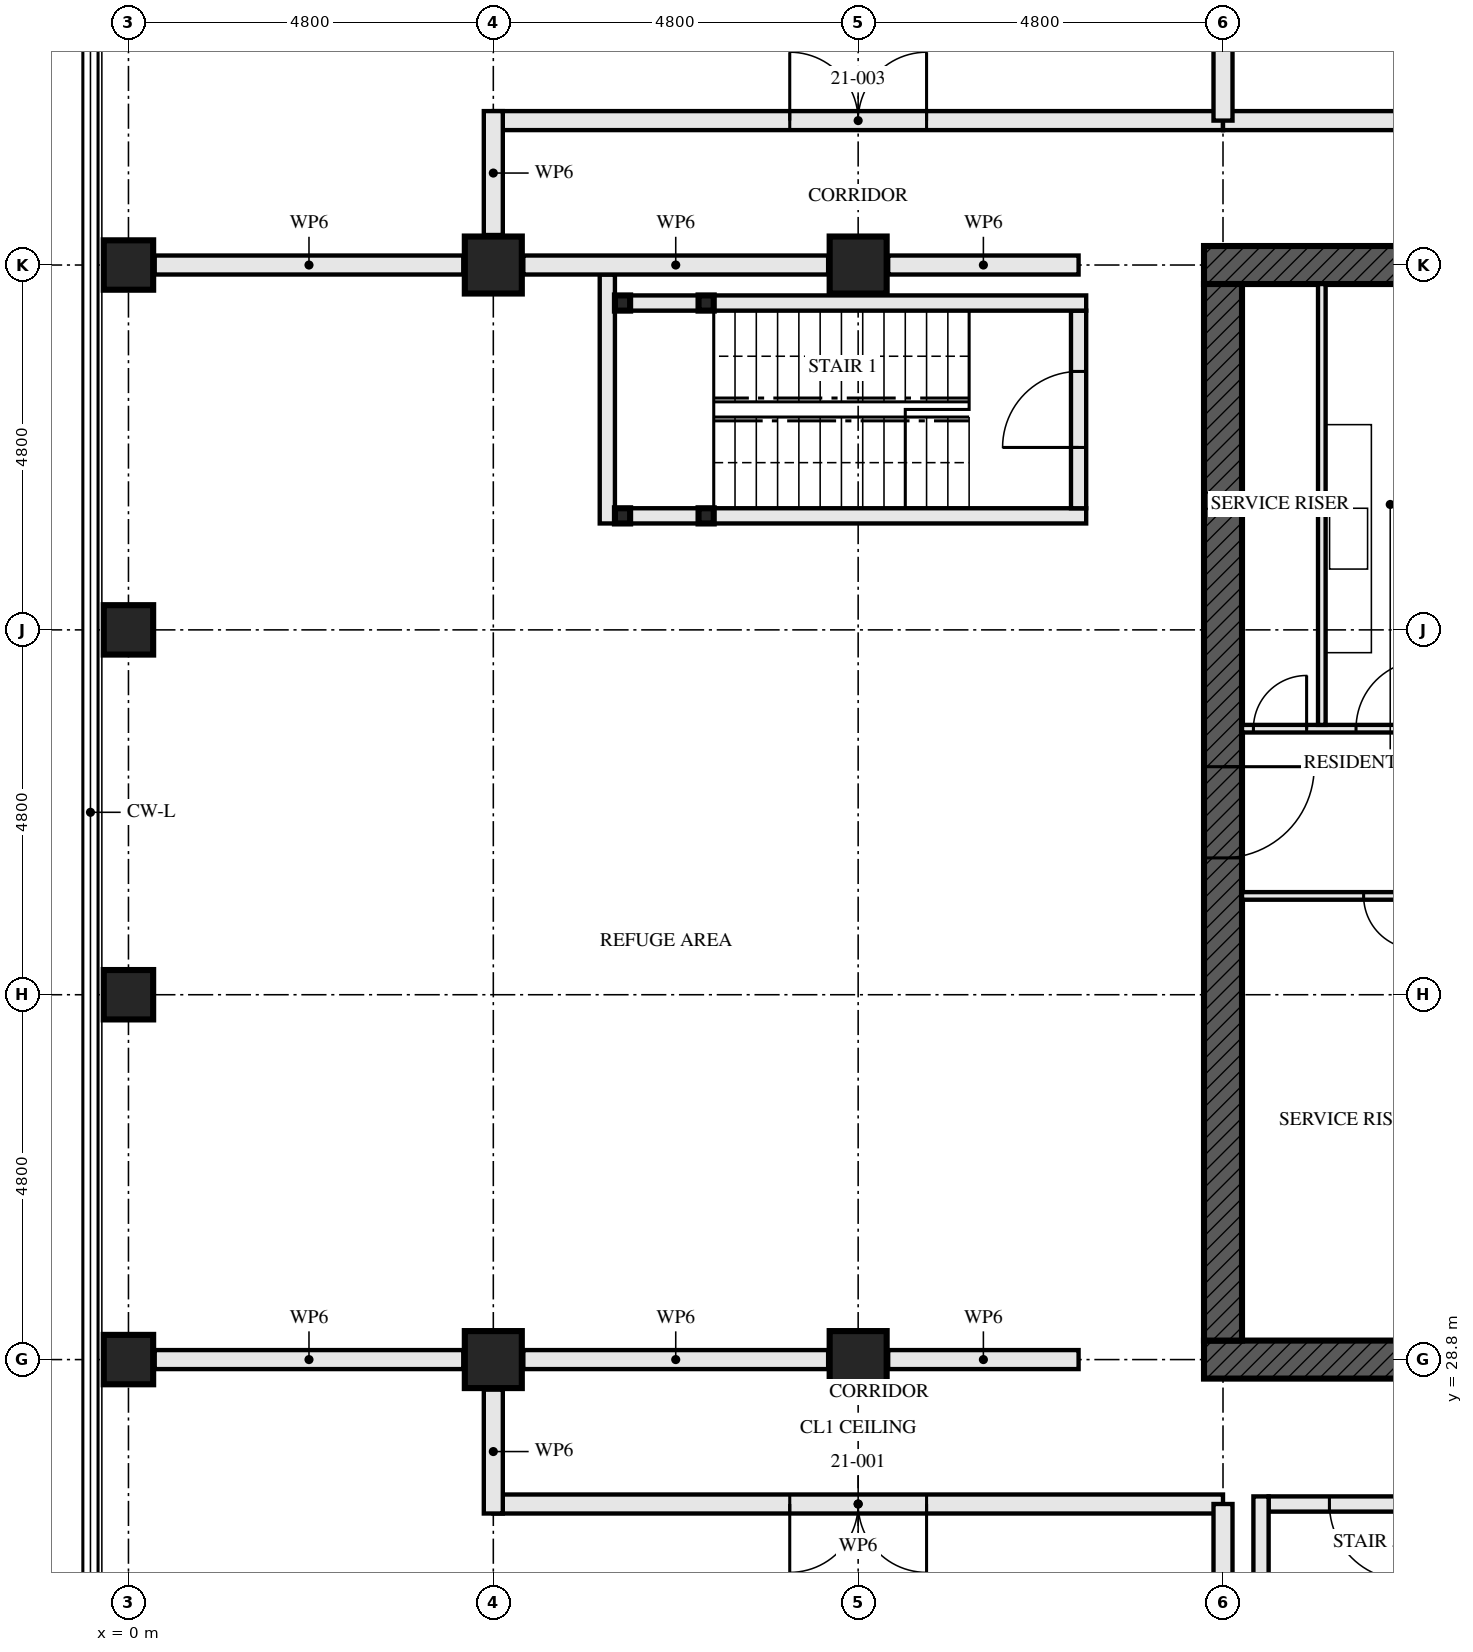
"""IFC4 building model, lengths in metres.
Left out: names, types, materials, properties, quantities, classifications, styles, units other than length and angle.
Written with IfcOpenShell. Run it as: python <this file> out.ifc"""

import sys

from ifc_helpers import new_model, si_unit, direction, frame, frame_2d, origin, origin_2d, place, context, subcontext, project, spatial, rectangle, hollow_rectangle, extrude, element, fill, save


model = new_model("IFC4")
c1 = context("Model", 3, precision=1e-05, world=origin(), true_north=direction((0.0, 1.0)))
c2 = subcontext(c1, "Body", "Model", "MODEL_VIEW")
j1 = project(units=[si_unit("LENGTHUNIT", "METRE"), si_unit("PLANEANGLEUNIT", "RADIAN")], contexts=[c1])
p1 = place(None, origin())
s1 = spatial("IfcSite", under=j1, at=p1, CompositionType="ELEMENT")
p2 = place(p1, origin())
s2 = spatial("IfcBuilding", under=s1, at=p2, CompositionType="ELEMENT")
p3 = place(p2, frame((0.0, 0.0, 79.5)))
s3 = spatial("IfcBuildingStorey", under=s2, at=p3, CompositionType="ELEMENT", Elevation=79.5)
p4 = place(p3, frame((0.0, 28.8, 0.0), z_axis=(0.0, 0.0, 1.0), x_axis=(0.0, 1.0, 0.0)))
e1 = element("IfcColumn", 1, at=p4, inside=s3, PredefinedType="COLUMN", context=c2, shape_type="SweptSolid", body=[
    extrude(hollow_rectangle(XDim=0.65, YDim=0.65, WallThickness=0.08, at=origin_2d()), origin(), (0.0, 0.0, 1.0), 4.33),
])
for number, where, z_axis, x_axis in (
    (2, (0.0, 33.6, 0.0), (0.0, 0.0, 1.0), (1.0, 0.0, 0.0)),
    (3, (0.0, 38.4, 0.0), (0.0, 0.0, 1.0), (1.0, 0.0, 0.0)),
    (4, (0.0, 43.2, 0.0), (0.0, 0.0, 1.0), (0.0, 1.0, 0.0)),
):
    element("IfcColumn", number, at=place(p3, frame(where, z_axis=z_axis, x_axis=x_axis)), inside=s3, PredefinedType="COLUMN", context=c2, shape_type="SweptSolid", body=[
        extrude(hollow_rectangle(XDim=0.65, YDim=0.65, WallThickness=0.08, at=origin_2d()), origin(), (0.0, 0.0, 1.0), 4.5),
    ])
for number, where, z_axis, x_axis in (
    (5, (4.8, 28.8, 0.0), (0.0, 0.0, 1.0), (0.0, 1.0, 0.0)),
    (6, (4.8, 43.2, 0.0), (0.0, 0.0, 1.0), (0.0, 1.0, 0.0)),
    (7, (9.6, 28.8, 0.0), (0.0, 0.0, 1.0), (0.0, 1.0, 0.0)),
    (8, (9.6, 43.2, 0.0), (0.0, 0.0, 1.0), (0.0, 1.0, 0.0)),
):
    element("IfcColumn", number, at=place(p3, frame(where, z_axis=z_axis, x_axis=x_axis)), inside=s3, PredefinedType="COLUMN", context=c2, shape_type="SweptSolid", body=[
        extrude(hollow_rectangle(XDim=0.75, YDim=0.75, WallThickness=0.08, at=origin_2d()), origin(), (0.0, 0.0, 1.0), 4.5),
    ])
p5 = place(p3, frame((14.15, 28.8, -0.25), z_axis=(0.0, 0.0, 1.0), x_axis=(1.0, 0.0, 0.0)))
e9 = element("IfcWall", 9, at=p5, inside=s3, PredefinedType="SHEAR", context=c2, shape_type="SweptSolid", body=[
    extrude(rectangle(XDim=14.9, YDim=0.5, at=frame_2d((7.45, 0.0))), origin(), (0.0, 0.0, 1.0), 4.58),
])
p6 = place(p5, frame((6.85, 0.0, 0.25)))
e10 = element("IfcOpeningElement", 10, at=p6, cuts=e9, PredefinedType="OPENING", context=c2, shape_type="SweptSolid", body=[
    extrude(rectangle(XDim=1.2, YDim=2.1, at=frame_2d((0.6, 1.05))), frame((0.0, 0.26, 0.0), z_axis=(0.0, -1.0, 0.0), x_axis=(1.0, 0.0, 0.0)), (0.0, 0.0, 1.0), 0.521),
])
p7 = place(p3, frame((29.05, 43.2, -0.25), z_axis=(0.0, 0.0, 1.0), x_axis=(-1.0, 0.0, 0.0)))
e11 = element("IfcWall", 11, at=p7, inside=s3, PredefinedType="SHEAR", context=c2, shape_type="SweptSolid", body=[
    extrude(rectangle(XDim=14.9, YDim=0.5, at=frame_2d((7.45, 0.0))), origin(), (0.0, 0.0, 1.0), 4.58),
])
p8 = place(p7, frame((6.85, 0.0, 0.25)))
e12 = element("IfcOpeningElement", 12, at=p8, cuts=e11, PredefinedType="OPENING", context=c2, shape_type="SweptSolid", body=[
    extrude(rectangle(XDim=1.2, YDim=2.1, at=frame_2d((0.6, 1.05))), frame((0.0, 0.26, 0.0), z_axis=(0.0, -1.0, 0.0), x_axis=(1.0, 0.0, 0.0)), (0.0, 0.0, 1.0), 0.521),
])
p9 = place(p3, frame((14.4, 42.95, -0.25), z_axis=(0.0, 0.0, 1.0), x_axis=(0.0, -1.0, 0.0)))
e13 = element("IfcWall", 13, at=p9, inside=s3, PredefinedType="SHEAR", context=c2, shape_type="SweptSolid", body=[
    extrude(rectangle(XDim=13.9, YDim=0.5, at=frame_2d((6.95, 0.0))), origin(), (0.0, 0.0, 1.0), 4.58),
])
p10 = place(p9, frame((6.35, 0.0, 0.25)))
e14 = element("IfcOpeningElement", 14, at=p10, cuts=e13, PredefinedType="OPENING", context=c2, shape_type="SweptSolid", body=[
    extrude(rectangle(XDim=1.2, YDim=2.1, at=frame_2d((0.6, 1.05))), frame((0.0, 0.26, 0.0), z_axis=(0.0, -1.0, 0.0), x_axis=(1.0, 0.0, 0.0)), (0.0, 0.0, 1.0), 0.521),
])
for number, where, z_axis, x_axis in (
    (15, (6.5, 42.7, 0.0), (0.0, 0.0, 1.0), (1.0, 0.0, 0.0)),
    (16, (6.5, 39.9, 0.0), (0.0, 0.0, 1.0), (1.0, 0.0, 0.0)),
    (17, (7.6, 42.7, 0.0), (0.0, 0.0, 1.0), (1.0, 0.0, 0.0)),
    (18, (7.6, 39.9, 0.0), (0.0, 0.0, 1.0), (1.0, 0.0, 0.0)),
):
    element("IfcColumn", number, at=place(p3, frame(where, z_axis=z_axis, x_axis=x_axis)), inside=s3, PredefinedType="COLUMN", context=c2, shape_type="SweptSolid", body=[
        extrude(hollow_rectangle(XDim=0.2, YDim=0.2, WallThickness=0.008, at=origin_2d()), origin(), (0.0, 0.0, 1.0), 4.33),
    ])
p11 = place(p3, frame((4.8, 26.9, 0.0), z_axis=(0.0, 0.0, 1.0), x_axis=(1.0, 0.0, 0.0)))
e19 = element("IfcWall", 19, at=p11, inside=s3, PredefinedType="SOLIDWALL", context=c2, shape_type="SweptSolid", body=[
    extrude(rectangle(XDim=9.6, YDim=0.25, at=frame_2d((4.8, 0.0))), origin(), (0.0, 0.0, 1.0), 4.33),
])
p12 = place(p11, frame((3.9, 0.0, 0.0)))
e20 = element("IfcOpeningElement", 20, at=p12, cuts=e19, PredefinedType="OPENING", context=c2, shape_type="SweptSolid", body=[
    extrude(rectangle(XDim=1.8, YDim=2.4, at=frame_2d((0.9, 1.2))), frame((0.0, 0.135, 0.0), z_axis=(0.0, -1.0, 0.0), x_axis=(1.0, 0.0, 0.0)), (0.0, 0.0, 1.0), 0.271),
])
p13 = place(p3, frame((4.8, 26.775, 0.0), z_axis=(0.0, 0.0, 1.0), x_axis=(0.0, 1.0, 0.0)))
e21 = element("IfcWall", 21, at=p13, inside=s3, PredefinedType="SOLIDWALL", context=c2, shape_type="SweptSolid", body=[
    extrude(rectangle(XDim=1.63, YDim=0.25, at=frame_2d((0.815, 0.0))), origin(), (0.0, 0.0, 1.0), 4.33),
])
p14 = place(p3, frame((6.6, 42.7, 0.0), z_axis=(0.0, 0.0, 1.0), x_axis=(1.0, 0.0, 0.0)))
e22 = element("IfcWall", 22, at=p14, inside=s3, PredefinedType="SOLIDWALL", context=c2, shape_type="SweptSolid", body=[
    extrude(rectangle(XDim=0.9, YDim=0.2, at=frame_2d((0.45, 0.0))), origin(), (0.0, 0.0, 1.0), 3.99),
])
p15 = place(p3, frame((7.7, 42.7, 0.0), z_axis=(0.0, 0.0, 1.0), x_axis=(1.0, 0.0, 0.0)))
e23 = element("IfcWall", 23, at=p15, inside=s3, PredefinedType="SOLIDWALL", context=c2, shape_type="SweptSolid", body=[
    extrude(rectangle(XDim=4.9, YDim=0.2, at=frame_2d((2.45, 0.0))), origin(), (0.0, 0.0, 1.0), 3.99),
])
p16 = place(p3, frame((6.6, 39.9, 0.0), z_axis=(0.0, 0.0, 1.0), x_axis=(1.0, 0.0, 0.0)))
e24 = element("IfcWall", 24, at=p16, inside=s3, PredefinedType="SOLIDWALL", context=c2, shape_type="SweptSolid", body=[
    extrude(rectangle(XDim=0.9, YDim=0.2, at=frame_2d((0.45, 0.0))), origin(), (0.0, 0.0, 1.0), 3.99),
])
p17 = place(p3, frame((7.7, 39.9, 0.0), z_axis=(0.0, 0.0, 1.0), x_axis=(1.0, 0.0, 0.0)))
e25 = element("IfcWall", 25, at=p17, inside=s3, PredefinedType="SOLIDWALL", context=c2, shape_type="SweptSolid", body=[
    extrude(rectangle(XDim=4.9, YDim=0.2, at=frame_2d((2.45, 0.0))), origin(), (0.0, 0.0, 1.0), 3.99),
])
p18 = place(p3, frame((6.3, 43.075, 0.0), z_axis=(0.0, 0.0, 1.0), x_axis=(0.0, -1.0, 0.0)))
e26 = element("IfcWall", 26, at=p18, inside=s3, PredefinedType="SOLIDWALL", context=c2, shape_type="SweptSolid", body=[
    extrude(rectangle(XDim=3.275, YDim=0.2, at=frame_2d((1.637, 0.0))), origin(), (0.0, 0.0, 1.0), 4.33),
])
p19 = place(p3, frame((12.5, 42.6, 0.0), z_axis=(0.0, 0.0, 1.0), x_axis=(0.0, -1.0, 0.0)))
e27 = element("IfcWall", 27, at=p19, inside=s3, PredefinedType="SOLIDWALL", context=c2, shape_type="SweptSolid", body=[
    extrude(rectangle(XDim=2.6, YDim=0.2, at=frame_2d((1.3, 0.0))), origin(), (0.0, 0.0, 1.0), 4.33),
])
p20 = place(p19, frame((0.8, 0.0, 0.0)))
e28 = element("IfcOpeningElement", 28, at=p20, cuts=e27, PredefinedType="OPENING", context=c2, shape_type="SweptSolid", body=[
    extrude(rectangle(XDim=1.0, YDim=2.1, at=frame_2d((0.5, 1.05))), frame((0.0, 0.111, 0.0), z_axis=(0.0, -1.0, 0.0), x_axis=(1.0, 0.0, 0.0)), (0.0, 0.0, 1.0), 0.221),
])
p21 = place(p3, frame((14.4, 45.1, 0.0), z_axis=(0.0, 0.0, 1.0), x_axis=(-1.0, 0.0, 0.0)))
e29 = element("IfcWall", 29, at=p21, inside=s3, PredefinedType="SOLIDWALL", context=c2, shape_type="SweptSolid", body=[
    extrude(rectangle(XDim=9.6, YDim=0.25, at=frame_2d((4.8, 0.0))), origin(), (0.0, 0.0, 1.0), 4.33),
])
p22 = place(p21, frame((3.9, 0.0, 0.0)))
e30 = element("IfcOpeningElement", 30, at=p22, cuts=e29, PredefinedType="OPENING", context=c2, shape_type="SweptSolid", body=[
    extrude(rectangle(XDim=1.8, YDim=2.4, at=frame_2d((0.9, 1.2))), frame((0.0, 0.135, 0.0), z_axis=(0.0, -1.0, 0.0), x_axis=(1.0, 0.0, 0.0)), (0.0, 0.0, 1.0), 0.271),
])
p23 = place(p3, frame((4.8, 45.225, 0.0), z_axis=(0.0, 0.0, 1.0), x_axis=(0.0, -1.0, 0.0)))
e31 = element("IfcWall", 31, at=p23, inside=s3, PredefinedType="SOLIDWALL", context=c2, shape_type="SweptSolid", body=[
    extrude(rectangle(XDim=1.63, YDim=0.25, at=frame_2d((0.815, 0.0))), origin(), (0.0, 0.0, 1.0), 4.33),
])
p24 = place(p3, frame((14.9, 22.1, 0.0), z_axis=(0.0, 0.0, 1.0), x_axis=(0.0, 1.0, 0.0)))
e32 = element("IfcWall", 32, at=p24, inside=s3, PredefinedType="SOLIDWALL", context=c2, shape_type="SweptSolid", body=[
    extrude(rectangle(XDim=4.9, YDim=0.2, at=frame_2d((2.45, 0.0))), origin(), (0.0, 0.0, 1.0), 3.99),
])
p25 = place(p3, frame((15.0, 26.9, 0.0), z_axis=(0.0, 0.0, 1.0), x_axis=(1.0, 0.0, 0.0)))
e33 = element("IfcWall", 33, at=p25, inside=s3, PredefinedType="SOLIDWALL", context=c2, shape_type="SweptSolid", body=[
    extrude(rectangle(XDim=2.6, YDim=0.2, at=frame_2d((1.3, 0.0))), origin(), (0.0, 0.0, 1.0), 4.33),
])
p26 = place(p25, frame((0.8, 0.0, 0.0)))
e34 = element("IfcOpeningElement", 34, at=p26, cuts=e33, PredefinedType="OPENING", context=c2, shape_type="SweptSolid", body=[
    extrude(rectangle(XDim=1.0, YDim=2.1, at=frame_2d((0.5, 1.05))), frame((0.0, 0.111, 0.0), z_axis=(0.0, -1.0, 0.0), x_axis=(1.0, 0.0, 0.0)), (0.0, 0.0, 1.0), 0.221),
])
p27 = place(p3, frame((28.8, 45.1, 0.0), z_axis=(0.0, 0.0, 1.0), x_axis=(-1.0, 0.0, 0.0)))
e35 = element("IfcWall", 35, at=p27, inside=s3, PredefinedType="SOLIDWALL", context=c2, shape_type="SweptSolid", body=[
    extrude(rectangle(XDim=14.4, YDim=0.25, at=frame_2d((7.2, 0.0))), origin(), (0.0, 0.0, 1.0), 4.33),
])
p28 = place(p27, frame((6.3, 0.0, 0.0)))
e36 = element("IfcOpeningElement", 36, at=p28, cuts=e35, PredefinedType="OPENING", context=c2, shape_type="SweptSolid", body=[
    extrude(rectangle(XDim=1.8, YDim=2.4, at=frame_2d((0.9, 1.2))), frame((0.0, 0.135, 0.0), z_axis=(0.0, -1.0, 0.0), x_axis=(1.0, 0.0, 0.0)), (0.0, 0.0, 1.0), 0.271),
])
p29 = place(p3, frame((15.7, 37.15, 0.0), z_axis=(0.0, 0.0, 1.0), x_axis=(0.0, 1.0, 0.0)))
e37 = element("IfcWall", 37, at=p29, inside=s3, PredefinedType="SOLIDWALL", context=c2, shape_type="SweptSolid", body=[
    extrude(rectangle(XDim=5.8, YDim=0.1, at=frame_2d((2.9, 0.0))), origin(), (0.0, 0.0, 1.0), 4.33),
])
p30 = place(p3, frame((14.65, 34.9, 0.0), z_axis=(0.0, 0.0, 1.0), x_axis=(1.0, 0.0, 0.0)))
e38 = element("IfcWall", 38, at=p30, inside=s3, PredefinedType="SOLIDWALL", context=c2, shape_type="SweptSolid", body=[
    extrude(rectangle(XDim=5.9, YDim=0.1, at=frame_2d((2.95, 0.0))), origin(), (0.0, 0.0, 1.0), 4.33),
])
p31 = place(p30, frame((1.6, 0.0, 0.0)))
e39 = element("IfcOpeningElement", 39, at=p31, cuts=e38, PredefinedType="OPENING", context=c2, shape_type="SweptSolid", body=[
    extrude(rectangle(XDim=0.7, YDim=2.1, at=frame_2d((0.35, 1.05))), frame((0.0, 0.061, 0.0), z_axis=(0.0, -1.0, 0.0), x_axis=(1.0, 0.0, 0.0)), (0.0, 0.0, 1.0), 0.121),
])
p32 = place(p3, frame((14.65, 37.1, 0.0), z_axis=(0.0, 0.0, 1.0), x_axis=(1.0, 0.0, 0.0)))
e40 = element("IfcWall", 40, at=p32, inside=s3, PredefinedType="SOLIDWALL", context=c2, shape_type="SweptSolid", body=[
    extrude(rectangle(XDim=5.9, YDim=0.1, at=frame_2d((2.95, 0.0))), origin(), (0.0, 0.0, 1.0), 4.33),
])
p33 = place(p32, frame((0.15, 0.0, 0.0)))
e41 = element("IfcOpeningElement", 41, at=p33, cuts=e40, PredefinedType="OPENING", context=c2, shape_type="SweptSolid", body=[
    extrude(rectangle(XDim=0.7, YDim=2.1, at=frame_2d((0.35, 1.05))), frame((0.0, 0.061, 0.0), z_axis=(0.0, -1.0, 0.0), x_axis=(1.0, 0.0, 0.0)), (0.0, 0.0, 1.0), 0.121),
])
p34 = place(p32, frame((1.5, 0.0, 0.0)))
e42 = element("IfcOpeningElement", 42, at=p34, cuts=e40, PredefinedType="OPENING", context=c2, shape_type="SweptSolid", body=[
    extrude(rectangle(XDim=0.9, YDim=2.1, at=frame_2d((0.45, 1.05))), frame((0.0, 0.061, 0.0), z_axis=(0.0, -1.0, 0.0), x_axis=(1.0, 0.0, 0.0)), (0.0, 0.0, 1.0), 0.121),
])
p35 = place(p3, frame((12.5, 28.8, 0.0), z_axis=(0.0, 0.0, 1.0), x_axis=(-1.0, 0.0, 0.0)))
e43 = element("IfcWall", 43, at=p35, inside=s3, PredefinedType="SOLIDWALL", context=c2, shape_type="SweptSolid", body=[
    extrude(rectangle(XDim=2.505, YDim=0.25, at=frame_2d((1.252, 0.0))), origin(), (0.0, 0.0, 1.0), 3.12),
])
p36 = place(p3, frame((9.205, 28.8, 0.0), z_axis=(0.0, 0.0, 1.0), x_axis=(-1.0, 0.0, 0.0)))
e44 = element("IfcWall", 44, at=p36, inside=s3, PredefinedType="SOLIDWALL", context=c2, shape_type="SweptSolid", body=[
    extrude(rectangle(XDim=4.01, YDim=0.25, at=frame_2d((2.005, 0.0))), origin(), (0.0, 0.0, 1.0), 3.12),
])
p37 = place(p3, frame((4.405, 28.8, 0.0), z_axis=(0.0, 0.0, 1.0), x_axis=(-1.0, 0.0, 0.0)))
e45 = element("IfcWall", 45, at=p37, inside=s3, PredefinedType="SOLIDWALL", context=c2, shape_type="SweptSolid", body=[
    extrude(rectangle(XDim=4.06, YDim=0.25, at=frame_2d((2.03, 0.0))), origin(), (0.0, 0.0, 1.0), 3.12),
])
p38 = place(p3, frame((14.4, 24.395, 0.0), z_axis=(0.0, 0.0, 1.0), x_axis=(0.0, 1.0, 0.0)))
e46 = element("IfcWall", 46, at=p38, inside=s3, PredefinedType="SOLIDWALL", context=c2, shape_type="SweptSolid", body=[
    extrude(rectangle(XDim=2.505, YDim=0.25, at=frame_2d((1.252, 0.0))), origin(), (0.0, 0.0, 1.0), 2.82),
])
p39 = place(p3, frame((12.5, 43.2, 0.0), z_axis=(0.0, 0.0, 1.0), x_axis=(-1.0, 0.0, 0.0)))
e47 = element("IfcWall", 47, at=p39, inside=s3, PredefinedType="SOLIDWALL", context=c2, shape_type="SweptSolid", body=[
    extrude(rectangle(XDim=2.505, YDim=0.25, at=frame_2d((1.252, 0.0))), origin(), (0.0, 0.0, 1.0), 3.12),
])
p40 = place(p3, frame((9.205, 43.2, 0.0), z_axis=(0.0, 0.0, 1.0), x_axis=(-1.0, 0.0, 0.0)))
e48 = element("IfcWall", 48, at=p40, inside=s3, PredefinedType="SOLIDWALL", context=c2, shape_type="SweptSolid", body=[
    extrude(rectangle(XDim=4.01, YDim=0.25, at=frame_2d((2.005, 0.0))), origin(), (0.0, 0.0, 1.0), 3.12),
])
p41 = place(p3, frame((4.405, 43.2, 0.0), z_axis=(0.0, 0.0, 1.0), x_axis=(-1.0, 0.0, 0.0)))
e49 = element("IfcWall", 49, at=p41, inside=s3, PredefinedType="SOLIDWALL", context=c2, shape_type="SweptSolid", body=[
    extrude(rectangle(XDim=4.06, YDim=0.25, at=frame_2d((2.03, 0.0))), origin(), (0.0, 0.0, 1.0), 3.12),
])
p42 = place(p3, frame((14.4, 45.1, 0.0), z_axis=(0.0, 0.0, 1.0), x_axis=(0.0, 1.0, 0.0)))
e50 = element("IfcWall", 50, at=p42, inside=s3, PredefinedType="SOLIDWALL", context=c2, shape_type="SweptSolid", body=[
    extrude(rectangle(XDim=2.555, YDim=0.25, at=frame_2d((1.277, 0.0))), origin(), (0.0, 0.0, 1.0), 2.82),
])
p43 = place(p12, frame((1.8, 0.0, 0.0), z_axis=(0.0, 0.0, 1.0), x_axis=(-1.0, 0.0, 0.0)))
e51 = element("IfcDoor", 51, at=p43, inside=s3, OperationType="DOUBLE_DOOR_SINGLE_SWING", PredefinedType="DOOR", context=c2, shape_type="SweptSolid", body=[
    extrude(rectangle(XDim=1.8, YDim=2.4, at=frame_2d((0.9, 1.2))), frame((0.0, 0.032, 0.0), z_axis=(0.0, -1.0, 0.0), x_axis=(1.0, 0.0, 0.0)), (0.0, 0.0, 1.0), 0.064),
])
fill(e20, e51)
p44 = place(p20, frame((1.0, 0.0, 0.0), z_axis=(0.0, 0.0, 1.0), x_axis=(-1.0, 0.0, 0.0)))
e52 = element("IfcDoor", 52, at=p44, inside=s3, OperationType="SINGLE_SWING_RIGHT", PredefinedType="DOOR", context=c2, shape_type="SweptSolid", body=[
    extrude(rectangle(XDim=1.0, YDim=2.1, at=frame_2d((0.5, 1.05))), frame((0.0, 0.032, 0.0), z_axis=(0.0, -1.0, 0.0), x_axis=(1.0, 0.0, 0.0)), (0.0, 0.0, 1.0), 0.064),
])
fill(e28, e52)
p45 = place(p22, frame((1.8, 0.0, 0.0), z_axis=(0.0, 0.0, 1.0), x_axis=(-1.0, 0.0, 0.0)))
e53 = element("IfcDoor", 53, at=p45, inside=s3, OperationType="DOUBLE_DOOR_SINGLE_SWING", PredefinedType="DOOR", context=c2, shape_type="SweptSolid", body=[
    extrude(rectangle(XDim=1.8, YDim=2.4, at=frame_2d((0.9, 1.2))), frame((0.0, 0.032, 0.0), z_axis=(0.0, -1.0, 0.0), x_axis=(1.0, 0.0, 0.0)), (0.0, 0.0, 1.0), 0.064),
])
fill(e30, e53)
p46 = place(p26, frame((1.0, 0.0, 0.0), z_axis=(0.0, 0.0, 1.0), x_axis=(-1.0, 0.0, 0.0)))
e54 = element("IfcDoor", 54, at=p46, inside=s3, OperationType="SINGLE_SWING_RIGHT", PredefinedType="DOOR", context=c2, shape_type="SweptSolid", body=[
    extrude(rectangle(XDim=1.0, YDim=2.1, at=frame_2d((0.5, 1.05))), frame((0.0, 0.032, 0.0), z_axis=(0.0, -1.0, 0.0), x_axis=(1.0, 0.0, 0.0)), (0.0, 0.0, 1.0), 0.064),
])
fill(e34, e54)
p47 = place(p31, frame((0.7, 0.0, 0.0), z_axis=(0.0, 0.0, 1.0), x_axis=(-1.0, 0.0, 0.0)))
e55 = element("IfcDoor", 55, at=p47, inside=s3, OperationType="SINGLE_SWING_RIGHT", PredefinedType="DOOR", context=c2, shape_type="SweptSolid", body=[
    extrude(rectangle(XDim=0.7, YDim=2.1, at=frame_2d((0.35, 1.05))), frame((0.0, 0.027, 0.0), z_axis=(0.0, -1.0, 0.0), x_axis=(1.0, 0.0, 0.0)), (0.0, 0.0, 1.0), 0.054),
])
fill(e39, e55)
p48 = place(p33, origin())
e56 = element("IfcDoor", 56, at=p48, inside=s3, OperationType="SINGLE_SWING_LEFT", PredefinedType="DOOR", context=c2, shape_type="SweptSolid", body=[
    extrude(rectangle(XDim=0.7, YDim=2.1, at=frame_2d((0.35, 1.05))), frame((0.0, 0.027, 0.0), z_axis=(0.0, -1.0, 0.0), x_axis=(1.0, 0.0, 0.0)), (0.0, 0.0, 1.0), 0.054),
])
fill(e41, e56)
p49 = place(p34, origin())
e57 = element("IfcDoor", 57, at=p49, inside=s3, OperationType="SINGLE_SWING_LEFT", PredefinedType="DOOR", context=c2, shape_type="SweptSolid", body=[
    extrude(rectangle(XDim=0.9, YDim=2.1, at=frame_2d((0.45, 1.05))), frame((0.0, 0.027, 0.0), z_axis=(0.0, -1.0, 0.0), x_axis=(1.0, 0.0, 0.0)), (0.0, 0.0, 1.0), 0.054),
])
fill(e42, e57)
p50 = place(p10, origin())
e58 = element("IfcDoor", 58, at=p50, inside=s3, OperationType="SINGLE_SWING_LEFT", PredefinedType="DOOR", context=c2, shape_type="SweptSolid", body=[
    extrude(rectangle(XDim=1.2, YDim=2.1, at=frame_2d((0.6, 1.05))), frame((0.0, 0.027, 0.0), z_axis=(0.0, -1.0, 0.0), x_axis=(1.0, 0.0, 0.0)), (0.0, 0.0, 1.0), 0.054),
])
fill(e14, e58)
save(model, sys.argv[1])
